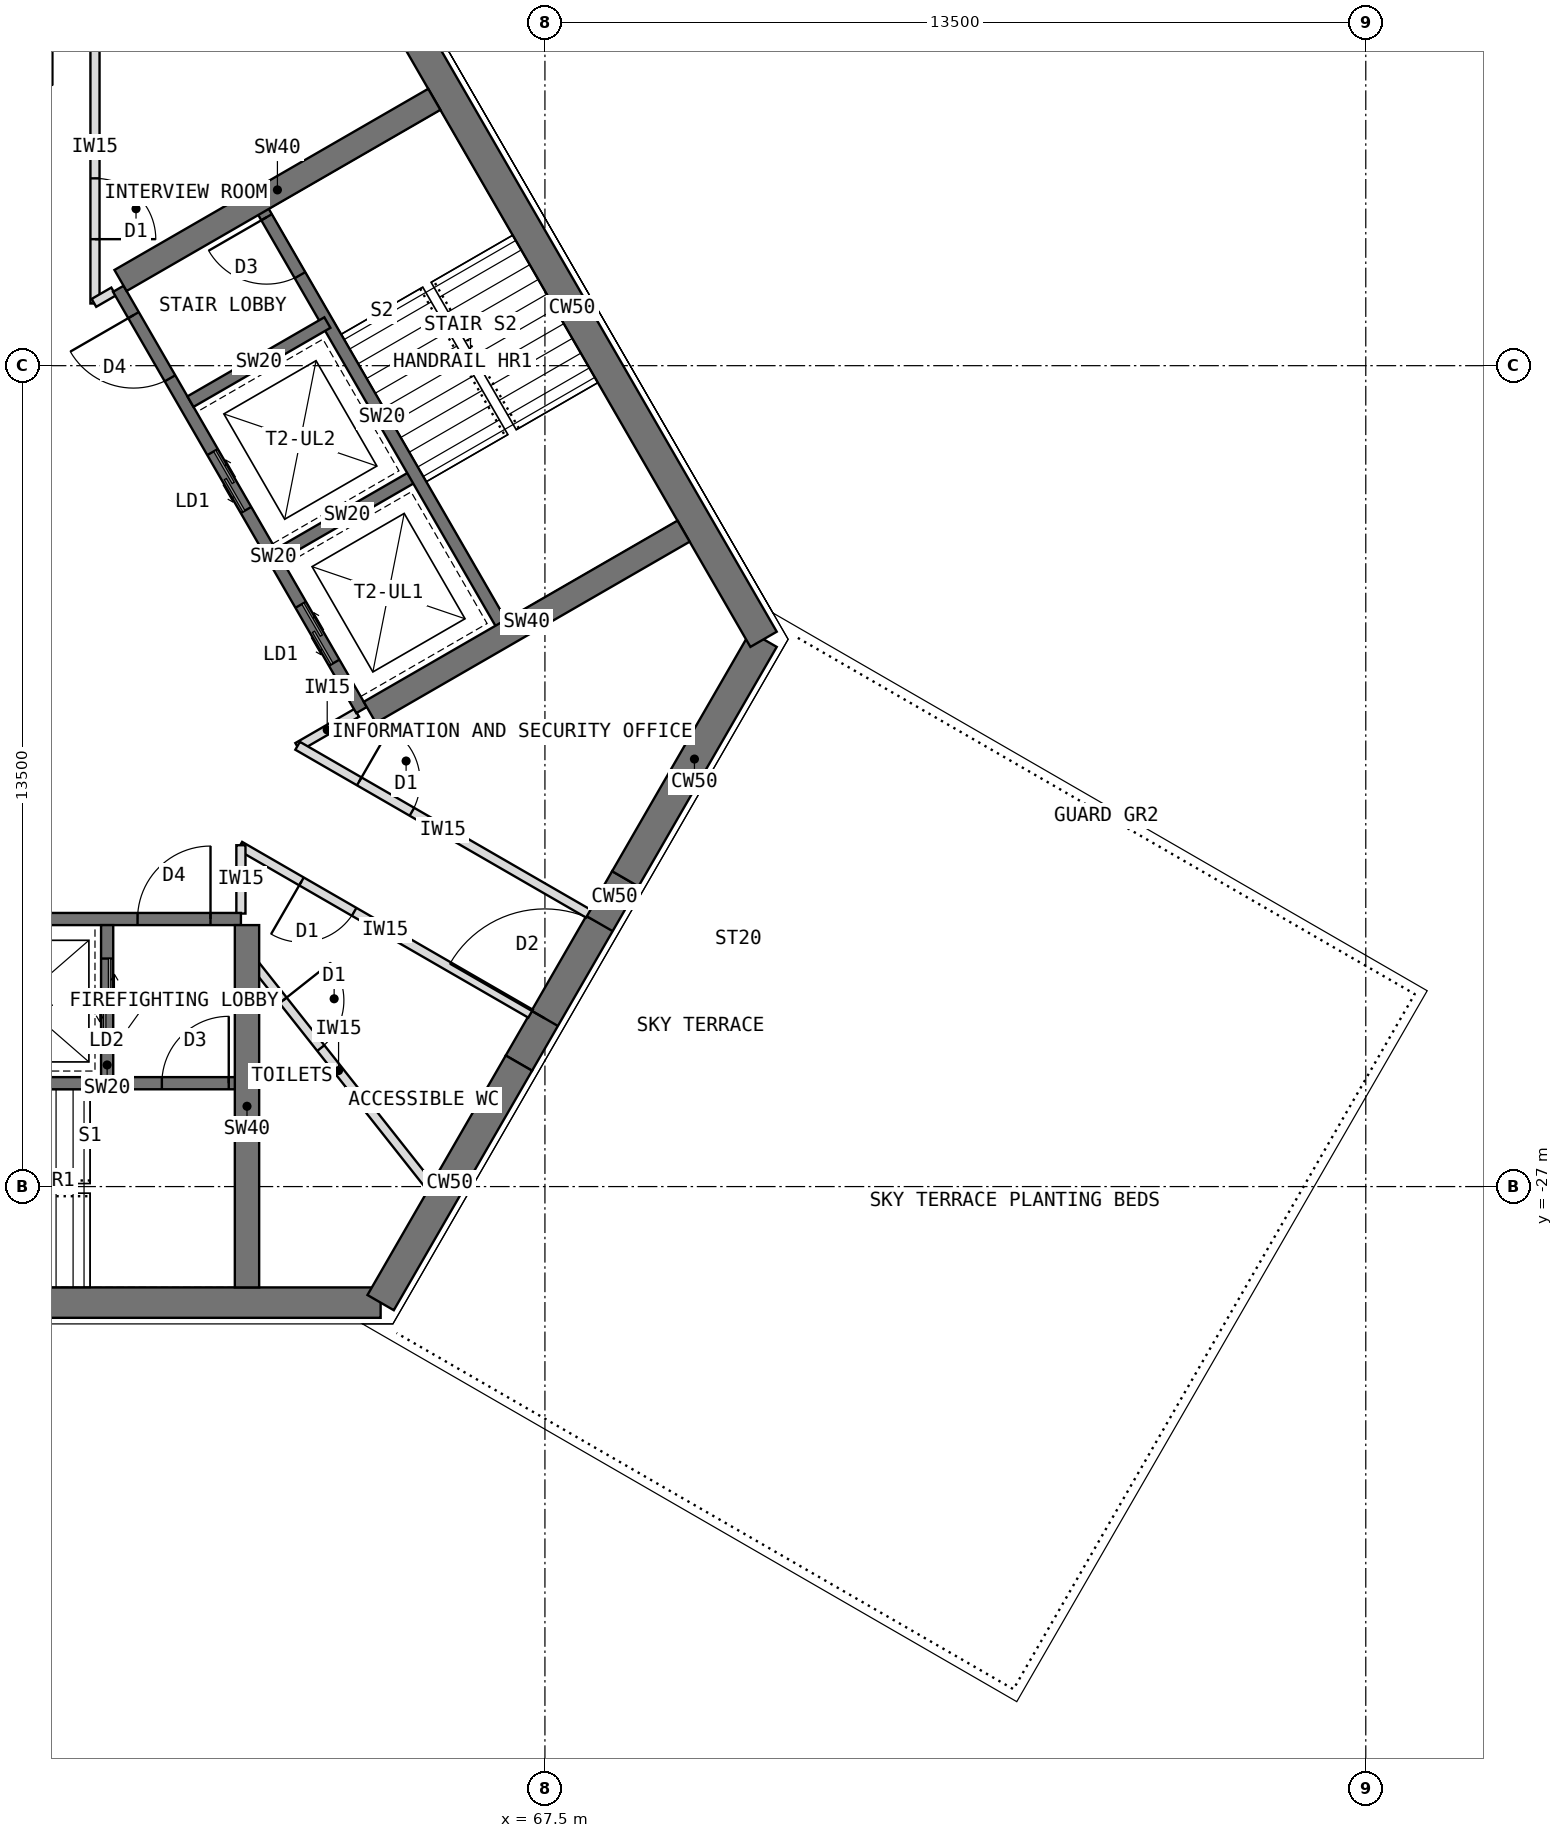
"""IFC4 building model, lengths in metres.
Left out: names, types, materials, properties, quantities, classifications, styles, units other than length and angle.
Written with IfcOpenShell. Run it as: python <this file> out.ifc"""

import sys

from ifc_helpers import new_model, si_unit, direction, frame, frame_2d, origin, place, context, subcontext, project, spatial, rectangle, extrude, element, fill, save


model = new_model("IFC4")
c1 = context("Model", 3, precision=1e-05, world=origin(), true_north=direction((0.0, 1.0)))
c2 = subcontext(c1, "Body", "Model", "MODEL_VIEW")
j1 = project(units=[si_unit("LENGTHUNIT", "METRE"), si_unit("PLANEANGLEUNIT", "RADIAN")], contexts=[c1])
p1 = place(None, origin())
s1 = spatial("IfcSite", under=j1, at=p1, CompositionType="ELEMENT")
p2 = place(p1, origin())
s2 = spatial("IfcBuilding", under=s1, at=p2, CompositionType="ELEMENT")
p3 = place(p2, frame((0.0, 0.0, 170.5)))
s3 = spatial("IfcBuildingStorey", under=s2, at=p3, CompositionType="ELEMENT", Elevation=170.5)
p4 = place(p3, frame((52.202, -28.908, 0.0), z_axis=(0.0, 0.0, 1.0), x_axis=(1.0, 0.0, 0.0)))
e1 = element("IfcWall", 1, at=p4, inside=s3, PredefinedType="SHEAR", context=c2, shape_type="SweptSolid", body=[
    extrude(rectangle(XDim=12.596, YDim=0.5, at=frame_2d((6.298, 0.0))), origin(), (0.0, 0.0, 1.0), 4.0),
])
p5 = place(p3, frame((64.798, -28.908, 0.0), z_axis=(0.0, 0.0, 1.0), x_axis=(0.499984222037, 0.866034513004, 0.0)))
e2 = element("IfcWall", 2, at=p5, inside=s3, PredefinedType="SHEAR", context=c2, shape_type="SweptSolid", body=[
    extrude(rectangle(XDim=4.548, YDim=0.5, at=frame_2d((2.274, 0.0))), origin(), (0.0, 0.0, 1.0), 4.0),
])
p6 = place(p3, frame((67.072, -24.97, 0.0), z_axis=(0.0, 0.0, 1.0), x_axis=(0.500010275428, 0.866019471182, 0.0)))
e3 = element("IfcWall", 3, at=p6, inside=s3, PredefinedType="SHEAR", context=c2, shape_type="SweptSolid", body=[
    extrude(rectangle(XDim=3.5, YDim=0.5, at=frame_2d((1.75, 0.0))), origin(), (0.0, 0.0, 1.0), 4.0),
])
p7 = place(p6, frame((0.85, 0.0, 0.0)))
e4 = element("IfcOpeningElement", 4, at=p7, cuts=e3, PredefinedType="OPENING", context=c2, shape_type="SweptSolid", body=[
    extrude(rectangle(XDim=1.8, YDim=2.1, at=frame_2d((0.9, 1.05))), frame((0.0, 0.26, 0.0), z_axis=(0.0, -1.0, 0.0), x_axis=(1.0, 0.0, 0.0)), (0.0, 0.0, 1.0), 0.52),
])
p8 = place(p3, frame((68.822, -21.939, 0.0), z_axis=(0.0, 0.0, 1.0), x_axis=(0.500024481964, 0.866011268655, 0.0)))
e5 = element("IfcWall", 5, at=p8, inside=s3, PredefinedType="SHEAR", context=c2, shape_type="SweptSolid", body=[
    extrude(rectangle(XDim=4.548, YDim=0.5, at=frame_2d((2.274, 0.0))), origin(), (0.0, 0.0, 1.0), 4.0),
])
p9 = place(p3, frame((71.096, -18.0, 0.0), z_axis=(0.0, 0.0, 1.0), x_axis=(-0.500005998175, 0.866021940709, 0.0)))
e6 = element("IfcWall", 6, at=p9, inside=s3, PredefinedType="SHEAR", context=c2, shape_type="SweptSolid", body=[
    extrude(rectangle(XDim=12.596, YDim=0.5, at=frame_2d((6.298, 0.0))), origin(), (0.0, 0.0, 1.0), 4.0),
])
p10 = place(p3, frame((54.5, -22.6, 0.0), z_axis=(0.0, 0.0, 1.0), x_axis=(1.0, 0.0, 0.0)))
e7 = element("IfcWall", 7, at=p10, inside=s3, PredefinedType="SHEAR", context=c2, shape_type="SweptSolid", body=[
    extrude(rectangle(XDim=8.0, YDim=0.2, at=frame_2d((4.0, 0.0))), origin(), (0.0, 0.0, 1.0), 4.0),
])
p11 = place(p10, frame((6.3, 0.0, 0.0)))
e8 = element("IfcOpeningElement", 8, at=p11, cuts=e7, PredefinedType="OPENING", context=c2, shape_type="SweptSolid", body=[
    extrude(rectangle(XDim=1.2, YDim=2.1, at=frame_2d((0.6, 1.05))), frame((0.0, 0.11, 0.0), z_axis=(0.0, -1.0, 0.0), x_axis=(1.0, 0.0, 0.0)), (0.0, 0.0, 1.0), 0.22),
])
p12 = place(p10, frame((0.9, 0.0, 0.0)))
e9 = element("IfcOpeningElement", 9, at=p12, cuts=e7, PredefinedType="OPENING", context=c2, shape_type="SweptSolid", body=[
    extrude(rectangle(XDim=1.1, YDim=2.2, at=frame_2d((0.55, 1.1))), frame((0.0, 0.11, 0.0), z_axis=(0.0, -1.0, 0.0), x_axis=(1.0, 0.0, 0.0)), (0.0, 0.0, 1.0), 0.22),
])
p13 = place(p3, frame((60.3, -22.7, 0.0), z_axis=(0.0, 0.0, 1.0), x_axis=(0.0, -1.0, 0.0)))
e10 = element("IfcWall", 10, at=p13, inside=s3, PredefinedType="SHEAR", context=c2, shape_type="SweptSolid", body=[
    extrude(rectangle(XDim=2.6, YDim=0.2, at=frame_2d((1.3, 0.0))), origin(), (0.0, 0.0, 1.0), 4.0),
])
p14 = place(p13, frame((0.55, 0.0, 0.0)))
e11 = element("IfcOpeningElement", 11, at=p14, cuts=e10, PredefinedType="OPENING", context=c2, shape_type="SweptSolid", body=[
    extrude(rectangle(XDim=1.3, YDim=2.2, at=frame_2d((0.65, 1.1))), frame((0.0, 0.11, 0.0), z_axis=(0.0, -1.0, 0.0), x_axis=(1.0, 0.0, 0.0)), (0.0, 0.0, 1.0), 0.22),
])
p15 = place(p3, frame((54.5, -25.3, 0.0), z_axis=(0.0, 0.0, 1.0), x_axis=(1.0, 0.0, 0.0)))
e12 = element("IfcWall", 12, at=p15, inside=s3, PredefinedType="SHEAR", context=c2, shape_type="SweptSolid", body=[
    extrude(rectangle(XDim=8.0, YDim=0.2, at=frame_2d((4.0, 0.0))), origin(), (0.0, 0.0, 1.0), 4.0),
])
p16 = place(p15, frame((6.7, 0.0, 0.0)))
e13 = element("IfcOpeningElement", 13, at=p16, cuts=e12, PredefinedType="OPENING", context=c2, shape_type="SweptSolid", body=[
    extrude(rectangle(XDim=1.1, YDim=2.1, at=frame_2d((0.55, 1.05))), frame((0.0, 0.11, 0.0), z_axis=(0.0, -1.0, 0.0), x_axis=(1.0, 0.0, 0.0)), (0.0, 0.0, 1.0), 0.22),
])
p17 = place(p3, frame((62.6, -22.7, 0.0), z_axis=(0.0, 0.0, 1.0), x_axis=(0.0, -1.0, 0.0)))
e14 = element("IfcWall", 14, at=p17, inside=s3, PredefinedType="SHEAR", context=c2, shape_type="SweptSolid", body=[
    extrude(rectangle(XDim=5.958, YDim=0.4, at=frame_2d((2.979, 0.0))), origin(), (0.0, 0.0, 1.0), 4.0),
])
p18 = place(p3, frame((64.484, -19.164, 0.0), z_axis=(0.0, 0.0, 1.0), x_axis=(-0.49999894854, 0.866026010844, 0.0)))
e15 = element("IfcWall", 15, at=p18, inside=s3, PredefinedType="SHEAR", context=c2, shape_type="SweptSolid", body=[
    extrude(rectangle(XDim=8.0, YDim=0.2, at=frame_2d((4.0, 0.0))), origin(), (0.0, 0.0, 1.0), 4.0),
])
p19 = place(p18, frame((6.3, 0.0, 0.0)))
e16 = element("IfcOpeningElement", 16, at=p19, cuts=e15, PredefinedType="OPENING", context=c2, shape_type="SweptSolid", body=[
    extrude(rectangle(XDim=1.2, YDim=2.1, at=frame_2d((0.6, 1.05))), frame((0.0, 0.11, 0.0), z_axis=(0.0, -1.0, 0.0), x_axis=(1.0, 0.0, 0.0)), (0.0, 0.0, 1.0), 0.22),
])
p20 = place(p18, frame((0.9, 0.0, 0.0)))
e17 = element("IfcOpeningElement", 17, at=p20, cuts=e15, PredefinedType="OPENING", context=c2, shape_type="SweptSolid", body=[
    extrude(rectangle(XDim=1.1, YDim=2.2, at=frame_2d((0.55, 1.1))), frame((0.0, 0.11, 0.0), z_axis=(0.0, -1.0, 0.0), x_axis=(1.0, 0.0, 0.0)), (0.0, 0.0, 1.0), 0.22),
])
p21 = place(p18, frame((3.8, 0.0, 0.0)))
e18 = element("IfcOpeningElement", 18, at=p21, cuts=e15, PredefinedType="OPENING", context=c2, shape_type="SweptSolid", body=[
    extrude(rectangle(XDim=1.1, YDim=2.2, at=frame_2d((0.55, 1.1))), frame((0.0, 0.11, 0.0), z_axis=(0.0, -1.0, 0.0), x_axis=(1.0, 0.0, 0.0)), (0.0, 0.0, 1.0), 0.22),
])
p22 = place(p3, frame((63.12, -16.603, 0.0), z_axis=(0.0, 0.0, 1.0), x_axis=(0.866062058628, 0.499936506574, 0.0)))
e19 = element("IfcWall", 19, at=p22, inside=s3, PredefinedType="SHEAR", context=c2, shape_type="SweptSolid", body=[
    extrude(rectangle(XDim=2.6, YDim=0.2, at=frame_2d((1.3, 0.0))), origin(), (0.0, 0.0, 1.0), 4.0),
])
p23 = place(p3, frame((61.67, -14.091, 0.0), z_axis=(0.0, 0.0, 1.0), x_axis=(0.86603858612, 0.49997716683, 0.0)))
e20 = element("IfcWall", 20, at=p23, inside=s3, PredefinedType="SHEAR", context=c2, shape_type="SweptSolid", body=[
    extrude(rectangle(XDim=2.6, YDim=0.2, at=frame_2d((1.3, 0.0))), origin(), (0.0, 0.0, 1.0), 4.0),
])
p24 = place(p3, frame((66.822, -17.814, 0.0), z_axis=(0.0, 0.0, 1.0), x_axis=(-0.49999894854, 0.866026010844, 0.0)))
e21 = element("IfcWall", 21, at=p24, inside=s3, PredefinedType="SHEAR", context=c2, shape_type="SweptSolid", body=[
    extrude(rectangle(XDim=8.0, YDim=0.2, at=frame_2d((4.0, 0.0))), origin(), (0.0, 0.0, 1.0), 4.0),
])
p25 = place(p24, frame((6.7, 0.0, 0.0)))
e22 = element("IfcOpeningElement", 22, at=p25, cuts=e21, PredefinedType="OPENING", context=c2, shape_type="SweptSolid", body=[
    extrude(rectangle(XDim=1.1, YDim=2.1, at=frame_2d((0.55, 1.05))), frame((0.0, 0.11, 0.0), z_axis=(0.0, -1.0, 0.0), x_axis=(1.0, 0.0, 0.0)), (0.0, 0.0, 1.0), 0.22),
])
p26 = place(p3, frame((60.52, -12.099, 0.0), z_axis=(0.0, 0.0, 1.0), x_axis=(0.86602319114, 0.500003832394, 0.0)))
e23 = element("IfcWall", 23, at=p26, inside=s3, PredefinedType="SHEAR", context=c2, shape_type="SweptSolid", body=[
    extrude(rectangle(XDim=5.958, YDim=0.4, at=frame_2d((2.979, 0.0))), origin(), (0.0, 0.0, 1.0), 4.0),
])
p27 = place(p3, frame((64.62, -19.201, 0.0), z_axis=(0.0, 0.0, 1.0), x_axis=(0.866012946976, 0.500021575205, 0.0)))
e24 = element("IfcWall", 24, at=p27, inside=s3, PredefinedType="SHEAR", context=c2, shape_type="SweptSolid", body=[
    extrude(rectangle(XDim=5.958, YDim=0.4, at=frame_2d((2.979, 0.0))), origin(), (0.0, 0.0, 1.0), 4.0),
])
p28 = place(p3, frame((60.1, -7.332, 0.0), z_axis=(0.0, 0.0, 1.0), x_axis=(0.0, -1.0, 0.0)))
e25 = element("IfcWall", 25, at=p28, inside=s3, PredefinedType="PARTITIONING", context=c2, shape_type="SweptSolid", body=[
    extrude(rectangle(XDim=5.146, YDim=0.15, at=frame_2d((2.573, 0.0))), origin(), (0.0, 0.0, 1.0), 3.8),
])
p29 = place(p28, frame((3.088, 0.0, 0.0)))
e26 = element("IfcOpeningElement", 26, at=p29, cuts=e25, PredefinedType="OPENING", context=c2, shape_type="SweptSolid", body=[
    extrude(rectangle(XDim=1.0, YDim=2.1, at=frame_2d((0.5, 1.05))), frame((0.0, 0.085, 0.0), z_axis=(0.0, -1.0, 0.0), x_axis=(1.0, 0.0, 0.0)), (0.0, 0.0, 1.0), 0.17),
])
p30 = place(p3, frame((60.083, -12.467, 0.0), z_axis=(0.0, 0.0, 1.0), x_axis=(0.866261881104, 0.499590185398, 0.0)))
e27 = element("IfcWall", 27, at=p30, inside=s3, PredefinedType="PARTITIONING", context=c2, shape_type="SweptSolid", body=[
    extrude(rectangle(XDim=0.373, YDim=0.15, at=frame_2d((0.187, 0.0))), origin(), (0.0, 0.0, 1.0), 3.8),
])
p31 = place(p3, frame((64.406, -19.209, 0.0), z_axis=(0.0, 0.0, 1.0), x_axis=(-0.865961255618, -0.500111091428, 0.0)))
e28 = element("IfcWall", 28, at=p31, inside=s3, PredefinedType="PARTITIONING", context=c2, shape_type="SweptSolid", body=[
    extrude(rectangle(XDim=1.124, YDim=0.15, at=frame_2d((0.562, 0.0))), origin(), (0.0, 0.0, 1.0), 3.8),
])
p32 = place(p3, frame((63.433, -19.751, 0.0), z_axis=(0.0, 0.0, 1.0), x_axis=(0.866033158832, -0.499986567624, 0.0)))
e29 = element("IfcWall", 29, at=p32, inside=s3, PredefinedType="PARTITIONING", context=c2, shape_type="SweptSolid", body=[
    extrude(rectangle(XDim=5.521, YDim=0.15, at=frame_2d((2.761, 0.0))), origin(), (0.0, 0.0, 1.0), 3.8),
])
p33 = place(p32, frame((1.17, 0.0, 0.0)))
e30 = element("IfcOpeningElement", 30, at=p33, cuts=e29, PredefinedType="OPENING", context=c2, shape_type="SweptSolid", body=[
    extrude(rectangle(XDim=1.0, YDim=2.1, at=frame_2d((0.5, 1.05))), frame((0.0, 0.085, 0.0), z_axis=(0.0, -1.0, 0.0), x_axis=(1.0, 0.0, 0.0)), (0.0, 0.0, 1.0), 0.17),
])
p34 = place(p3, frame((67.264, -24.157, 0.0), z_axis=(0.0, 0.0, 1.0), x_axis=(-0.866022103989, 0.50000571537, 0.0)))
e31 = element("IfcWall", 31, at=p34, inside=s3, PredefinedType="PARTITIONING", context=c2, shape_type="SweptSolid", body=[
    extrude(rectangle(XDim=5.521, YDim=0.15, at=frame_2d((2.76, 0.0))), origin(), (0.0, 0.0, 1.0), 3.8),
])
p35 = place(p34, frame((3.351, 0.0, 0.0)))
e32 = element("IfcOpeningElement", 32, at=p35, cuts=e31, PredefinedType="OPENING", context=c2, shape_type="SweptSolid", body=[
    extrude(rectangle(XDim=1.0, YDim=2.1, at=frame_2d((0.5, 1.05))), frame((0.0, 0.085, 0.0), z_axis=(0.0, -1.0, 0.0), x_axis=(1.0, 0.0, 0.0)), (0.0, 0.0, 1.0), 0.17),
])
p36 = place(p3, frame((62.5, -21.386, 0.0), z_axis=(0.0, 0.0, 1.0), x_axis=(0.0, -1.0, 0.0)))
e33 = element("IfcWall", 33, at=p36, inside=s3, PredefinedType="PARTITIONING", context=c2, shape_type="SweptSolid", body=[
    extrude(rectangle(XDim=1.124, YDim=0.15, at=frame_2d((0.562, 0.0))), origin(), (0.0, 0.0, 1.0), 3.8),
])
p37 = place(p3, frame((62.6, -23.187, 0.0), z_axis=(0.0, 0.0, 1.0), x_axis=(0.620111874039, -0.784513392923, 0.0)))
e34 = element("IfcWall", 34, at=p37, inside=s3, PredefinedType="PARTITIONING", context=c2, shape_type="SweptSolid", body=[
    extrude(rectangle(XDim=4.857, YDim=0.15, at=frame_2d((2.429, 0.0))), origin(), (0.0, 0.0, 1.0), 3.8),
])
p38 = place(p37, frame((0.957, 0.0, 0.0)))
e35 = element("IfcOpeningElement", 35, at=p38, cuts=e34, PredefinedType="OPENING", context=c2, shape_type="SweptSolid", body=[
    extrude(rectangle(XDim=1.0, YDim=2.1, at=frame_2d((0.5, 1.05))), frame((0.0, 0.085, 0.0), z_axis=(0.0, -1.0, 0.0), x_axis=(1.0, 0.0, 0.0)), (0.0, 0.0, 1.0), 0.17),
])
p39 = place(p11, origin())
e36 = element("IfcDoor", 36, at=p39, inside=s3, OperationType="SINGLE_SWING_RIGHT", PredefinedType="DOOR", context=c2, shape_type="SweptSolid", body=[
    extrude(rectangle(XDim=1.2, YDim=2.1, at=frame_2d((0.6, 1.05))), frame((0.0, 0.025, 0.0), z_axis=(0.0, -1.0, 0.0), x_axis=(1.0, 0.0, 0.0)), (0.0, 0.0, 1.0), 0.05),
])
fill(e8, e36)
p40 = place(p14, origin())
e37 = element("IfcDoor", 37, at=p40, inside=s3, OperationType="DOUBLE_DOOR_SLIDING", PredefinedType="DOOR", context=c2, shape_type="SweptSolid", body=[
    extrude(rectangle(XDim=1.3, YDim=2.2, at=frame_2d((0.65, 1.1))), frame((0.0, 0.025, 0.0), z_axis=(0.0, -1.0, 0.0), x_axis=(1.0, 0.0, 0.0)), (0.0, 0.0, 1.0), 0.05),
])
fill(e11, e37)
p41 = place(p16, origin())
e38 = element("IfcDoor", 38, at=p41, inside=s3, OperationType="SINGLE_SWING_RIGHT", PredefinedType="DOOR", context=c2, shape_type="SweptSolid", body=[
    extrude(rectangle(XDim=1.1, YDim=2.1, at=frame_2d((0.55, 1.05))), frame((0.0, 0.025, 0.0), z_axis=(0.0, -1.0, 0.0), x_axis=(1.0, 0.0, 0.0)), (0.0, 0.0, 1.0), 0.05),
])
fill(e13, e38)
p42 = place(p19, origin())
e39 = element("IfcDoor", 39, at=p42, inside=s3, OperationType="SINGLE_SWING_RIGHT", PredefinedType="DOOR", context=c2, shape_type="SweptSolid", body=[
    extrude(rectangle(XDim=1.2, YDim=2.1, at=frame_2d((0.6, 1.05))), frame((0.0, 0.025, 0.0), z_axis=(0.0, -1.0, 0.0), x_axis=(1.0, 0.0, 0.0)), (0.0, 0.0, 1.0), 0.05),
])
fill(e16, e39)
p43 = place(p20, origin())
e40 = element("IfcDoor", 40, at=p43, inside=s3, OperationType="DOUBLE_DOOR_SLIDING", PredefinedType="DOOR", context=c2, shape_type="SweptSolid", body=[
    extrude(rectangle(XDim=1.1, YDim=2.2, at=frame_2d((0.55, 1.1))), frame((0.0, 0.025, 0.0), z_axis=(0.0, -1.0, 0.0), x_axis=(1.0, 0.0, 0.0)), (0.0, 0.0, 1.0), 0.05),
])
fill(e17, e40)
p44 = place(p21, origin())
e41 = element("IfcDoor", 41, at=p44, inside=s3, OperationType="DOUBLE_DOOR_SLIDING", PredefinedType="DOOR", context=c2, shape_type="SweptSolid", body=[
    extrude(rectangle(XDim=1.1, YDim=2.2, at=frame_2d((0.55, 1.1))), frame((0.0, 0.025, 0.0), z_axis=(0.0, -1.0, 0.0), x_axis=(1.0, 0.0, 0.0)), (0.0, 0.0, 1.0), 0.05),
])
fill(e18, e41)
p45 = place(p25, origin())
e42 = element("IfcDoor", 42, at=p45, inside=s3, OperationType="SINGLE_SWING_RIGHT", PredefinedType="DOOR", context=c2, shape_type="SweptSolid", body=[
    extrude(rectangle(XDim=1.1, YDim=2.1, at=frame_2d((0.55, 1.05))), frame((0.0, 0.025, 0.0), z_axis=(0.0, -1.0, 0.0), x_axis=(1.0, 0.0, 0.0)), (0.0, 0.0, 1.0), 0.05),
])
fill(e22, e42)
p46 = place(p7, origin())
e43 = element("IfcDoor", 43, at=p46, inside=s3, OperationType="DOUBLE_DOOR_DOUBLE_SWING", PredefinedType="DOOR", context=c2, shape_type="SweptSolid", body=[
    extrude(rectangle(XDim=1.8, YDim=2.1, at=frame_2d((0.9, 1.05))), frame((0.0, 0.025, 0.0), z_axis=(0.0, -1.0, 0.0), x_axis=(1.0, 0.0, 0.0)), (0.0, 0.0, 1.0), 0.05),
])
fill(e4, e43)
p47 = place(p38, origin())
e44 = element("IfcDoor", 44, at=p47, inside=s3, OperationType="SINGLE_SWING_LEFT", PredefinedType="DOOR", context=c2, shape_type="SweptSolid", body=[
    extrude(rectangle(XDim=1.0, YDim=2.1, at=frame_2d((0.5, 1.05))), frame((0.0, 0.025, 0.0), z_axis=(0.0, -1.0, 0.0), x_axis=(1.0, 0.0, 0.0)), (0.0, 0.0, 1.0), 0.05),
])
fill(e35, e44)
p48 = place(p35, origin())
e45 = element("IfcDoor", 45, at=p48, inside=s3, OperationType="SINGLE_SWING_RIGHT", PredefinedType="DOOR", context=c2, shape_type="SweptSolid", body=[
    extrude(rectangle(XDim=1.0, YDim=2.1, at=frame_2d((0.5, 1.05))), frame((0.0, 0.025, 0.0), z_axis=(0.0, -1.0, 0.0), x_axis=(1.0, 0.0, 0.0)), (0.0, 0.0, 1.0), 0.05),
])
fill(e32, e45)
p49 = place(p33, origin())
e46 = element("IfcDoor", 46, at=p49, inside=s3, OperationType="SINGLE_SWING_LEFT", PredefinedType="DOOR", context=c2, shape_type="SweptSolid", body=[
    extrude(rectangle(XDim=1.0, YDim=2.1, at=frame_2d((0.5, 1.05))), frame((0.0, 0.025, 0.0), z_axis=(0.0, -1.0, 0.0), x_axis=(1.0, 0.0, 0.0)), (0.0, 0.0, 1.0), 0.05),
])
fill(e30, e46)
p50 = place(p29, origin())
e47 = element("IfcDoor", 47, at=p50, inside=s3, OperationType="SINGLE_SWING_RIGHT", PredefinedType="DOOR", context=c2, shape_type="SweptSolid", body=[
    extrude(rectangle(XDim=1.0, YDim=2.1, at=frame_2d((0.5, 1.05))), frame((0.0, 0.025, 0.0), z_axis=(0.0, -1.0, 0.0), x_axis=(1.0, 0.0, 0.0)), (0.0, 0.0, 1.0), 0.05),
])
fill(e26, e47)
save(model, sys.argv[1])
